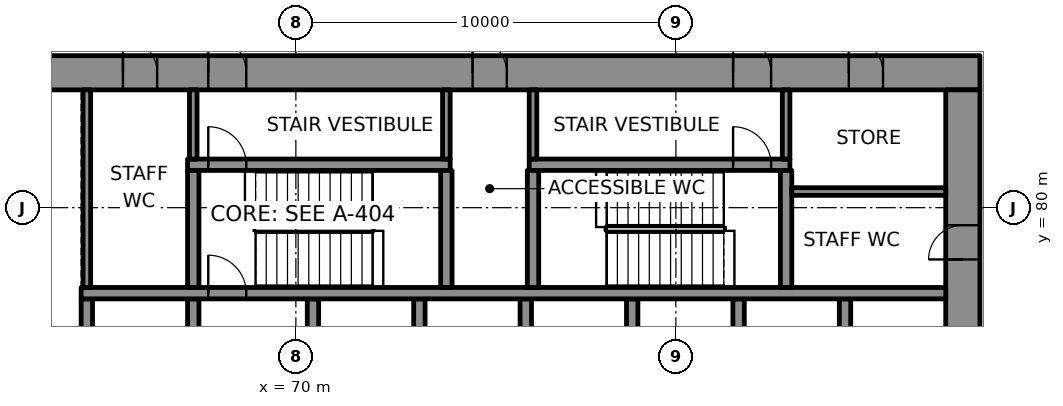
"""IFC4 building model, lengths in metres.
Left out: names, types, materials, properties, quantities, classifications, styles, units other than length and angle.
Written with IfcOpenShell. Run it as: python <this file> out.ifc"""

import sys

from ifc_helpers import new_model, si_unit, direction, frame, frame_2d, origin, place, context, subcontext, project, spatial, rectangle, extrude, element, fill, save


model = new_model("IFC4")
c1 = context("Model", 3, precision=1e-05, world=origin(), true_north=direction((0.0, 1.0)))
c2 = subcontext(c1, "Body", "Model", "MODEL_VIEW")
j1 = project(units=[si_unit("LENGTHUNIT", "METRE"), si_unit("PLANEANGLEUNIT", "RADIAN")], contexts=[c1])
p1 = place(None, origin())
s1 = spatial("IfcSite", under=j1, at=p1, CompositionType="ELEMENT")
p2 = place(p1, origin())
s2 = spatial("IfcBuilding", under=s1, at=p2, CompositionType="ELEMENT")
p3 = place(p2, frame((0.0, 0.0, 48.4)))
s3 = spatial("IfcBuildingStorey", under=s2, at=p3, CompositionType="ELEMENT", Elevation=48.4)
p4 = place(p3, frame((62.9, 83.55, 0.0), z_axis=(0.0, 0.0, 1.0), x_axis=(1.0, 0.0, 0.0)))
e1 = element("IfcWall", 1, at=p4, inside=s3, PredefinedType="SHEAR", context=c2, shape_type="SweptSolid", body=[
    extrude(rectangle(XDim=25.1, YDim=0.9, at=frame_2d((12.55, 0.0))), origin(), (0.0, 0.0, 1.0), 4.0),
])
p5 = place(p4, frame((4.795, 0.0, 0.0)))
e2 = element("IfcOpeningElement", 2, at=p5, cuts=e1, PredefinedType="OPENING", context=c2, shape_type="SweptSolid", body=[
    extrude(rectangle(XDim=1.0, YDim=2.1, at=frame_2d((0.5, 1.05))), frame((0.0, 0.46, 0.0), z_axis=(0.0, -1.0, 0.0), x_axis=(1.0, 0.0, 0.0)), (0.0, 0.0, 1.0), 0.92),
])
p6 = place(p4, frame((18.605, 0.0, 0.0)))
e3 = element("IfcOpeningElement", 3, at=p6, cuts=e1, PredefinedType="OPENING", context=c2, shape_type="SweptSolid", body=[
    extrude(rectangle(XDim=1.0, YDim=2.1, at=frame_2d((0.5, 1.05))), frame((0.0, 0.46, 0.0), z_axis=(0.0, -1.0, 0.0), x_axis=(1.0, 0.0, 0.0)), (0.0, 0.0, 1.0), 0.92),
])
p7 = place(p4, frame((2.55, 0.0, 0.0)))
e4 = element("IfcOpeningElement", 4, at=p7, cuts=e1, PredefinedType="OPENING", context=c2, shape_type="SweptSolid", body=[
    extrude(rectangle(XDim=0.9, YDim=2.1, at=frame_2d((0.45, 1.05))), frame((0.0, 0.46, 0.0), z_axis=(0.0, -1.0, 0.0), x_axis=(1.0, 0.0, 0.0)), (0.0, 0.0, 1.0), 0.92),
])
p8 = place(p4, frame((11.75, 0.0, 0.0)))
e5 = element("IfcOpeningElement", 5, at=p8, cuts=e1, PredefinedType="OPENING", context=c2, shape_type="SweptSolid", body=[
    extrude(rectangle(XDim=0.9, YDim=2.1, at=frame_2d((0.45, 1.05))), frame((0.0, 0.46, 0.0), z_axis=(0.0, -1.0, 0.0), x_axis=(1.0, 0.0, 0.0)), (0.0, 0.0, 1.0), 0.92),
])
p9 = place(p4, frame((21.65, 0.0, 0.0)))
e6 = element("IfcOpeningElement", 6, at=p9, cuts=e1, PredefinedType="OPENING", context=c2, shape_type="SweptSolid", body=[
    extrude(rectangle(XDim=0.9, YDim=2.1, at=frame_2d((0.45, 1.05))), frame((0.0, 0.46, 0.0), z_axis=(0.0, -1.0, 0.0), x_axis=(1.0, 0.0, 0.0)), (0.0, 0.0, 1.0), 0.92),
])
p10 = place(p3, frame((87.55, 66.9, 0.0), z_axis=(0.0, 0.0, 1.0), x_axis=(0.0, 1.0, 0.0)))
e7 = element("IfcWall", 7, at=p10, inside=s3, PredefinedType="SHEAR", context=c2, shape_type="SweptSolid", body=[
    extrude(rectangle(XDim=16.2, YDim=0.9, at=frame_2d((8.1, 0.0))), origin(), (0.0, 0.0, 1.0), 4.0),
])
p11 = place(p10, frame((5.5, 0.0, 0.0)))
e8 = element("IfcOpeningElement", 8, at=p11, cuts=e7, PredefinedType="OPENING", context=c2, shape_type="SweptSolid", body=[
    extrude(rectangle(XDim=1.8, YDim=2.1, at=frame_2d((0.9, 1.05))), frame((0.0, 0.46, 0.0), z_axis=(0.0, -1.0, 0.0), x_axis=(1.0, 0.0, 0.0)), (0.0, 0.0, 1.0), 0.92),
])
p12 = place(p10, frame((11.738, 0.0, 0.0)))
e9 = element("IfcOpeningElement", 9, at=p12, cuts=e7, PredefinedType="OPENING", context=c2, shape_type="SweptSolid", body=[
    extrude(rectangle(XDim=0.9, YDim=2.1, at=frame_2d((0.45, 1.05))), frame((0.0, 0.46, 0.0), z_axis=(0.0, -1.0, 0.0), x_axis=(1.0, 0.0, 0.0)), (0.0, 0.0, 1.0), 0.92),
])
for number, where, z_axis, x_axis in (
    (10, (64.5, 75.0, 0.0), (0.0, 0.0, 1.0), (0.0, 1.0, 0.0)),
    (11, (67.3, 75.0, 0.0), (0.0, 0.0, 1.0), (0.0, 1.0, 0.0)),
):
    element("IfcWall", number, at=place(p3, frame(where, z_axis=z_axis, x_axis=x_axis)), inside=s3, PredefinedType="SHEAR", context=c2, shape_type="SweptSolid", body=[
        extrude(rectangle(XDim=2.6, YDim=0.3, at=frame_2d((1.3, 0.0))), origin(), (0.0, 0.0, 1.0), 4.0),
    ])
p13 = place(p3, frame((70.45, 75.0, 0.0), z_axis=(0.0, 0.0, 1.0), x_axis=(0.0, 1.0, 0.0)))
e12 = element("IfcWall", 12, at=p13, inside=s3, PredefinedType="SHEAR", context=c2, shape_type="SweptSolid", body=[
    extrude(rectangle(XDim=2.6, YDim=0.3, at=frame_2d((1.3, 0.0))), origin(), (0.0, 0.0, 1.0), 4.0),
])
p14 = place(p13, frame((0.15, 0.0, 0.0)))
e13 = element("IfcOpeningElement", 13, at=p14, cuts=e12, PredefinedType="OPENING", context=c2, shape_type="SweptSolid", body=[
    extrude(rectangle(XDim=1.1, YDim=2.1, at=frame_2d((0.55, 1.05))), frame((0.0, 0.16, 0.0), z_axis=(0.0, -1.0, 0.0), x_axis=(1.0, 0.0, 0.0)), (0.0, 0.0, 1.0), 0.32),
])
for number, where, z_axis, x_axis in (
    (14, (73.25, 75.0, 0.0), (0.0, 0.0, 1.0), (0.0, 1.0, 0.0)),
    (15, (76.05, 75.0, 0.0), (0.0, 0.0, 1.0), (0.0, 1.0, 0.0)),
    (16, (78.85, 75.0, 0.0), (0.0, 0.0, 1.0), (0.0, 1.0, 0.0)),
    (17, (81.65, 75.0, 0.0), (0.0, 0.0, 1.0), (0.0, 1.0, 0.0)),
    (18, (84.45, 75.0, 0.0), (0.0, 0.0, 1.0), (0.0, 1.0, 0.0)),
):
    element("IfcWall", number, at=place(p3, frame(where, z_axis=z_axis, x_axis=x_axis)), inside=s3, PredefinedType="SHEAR", context=c2, shape_type="SweptSolid", body=[
        extrude(rectangle(XDim=2.6, YDim=0.3, at=frame_2d((1.3, 0.0))), origin(), (0.0, 0.0, 1.0), 4.0),
    ])
p15 = place(p3, frame((64.35, 77.75, 0.0), z_axis=(0.0, 0.0, 1.0), x_axis=(1.0, 0.0, 0.0)))
e19 = element("IfcWall", 19, at=p15, inside=s3, PredefinedType="SHEAR", context=c2, shape_type="SweptSolid", body=[
    extrude(rectangle(XDim=22.75, YDim=0.3, at=frame_2d((11.375, 0.0))), origin(), (0.0, 0.0, 1.0), 4.0),
])
p16 = place(p15, frame((3.345, 0.0, 0.0)))
e20 = element("IfcOpeningElement", 20, at=p16, cuts=e19, PredefinedType="OPENING", context=c2, shape_type="SweptSolid", body=[
    extrude(rectangle(XDim=1.0, YDim=2.1, at=frame_2d((0.5, 1.05))), frame((0.0, 0.16, 0.0), z_axis=(0.0, -1.0, 0.0), x_axis=(1.0, 0.0, 0.0)), (0.0, 0.0, 1.0), 0.32),
])
p17 = place(p3, frame((67.15, 81.13, 0.0), z_axis=(0.0, 0.0, 1.0), x_axis=(1.0, 0.0, 0.0)))
e21 = element("IfcWall", 21, at=p17, inside=s3, PredefinedType="SHEAR", context=c2, shape_type="SweptSolid", body=[
    extrude(rectangle(XDim=6.91, YDim=0.3, at=frame_2d((3.455, 0.0))), origin(), (0.0, 0.0, 1.0), 4.0),
])
p18 = place(p17, frame((0.545, 0.0, 0.0)))
e22 = element("IfcOpeningElement", 22, at=p18, cuts=e21, PredefinedType="OPENING", context=c2, shape_type="SweptSolid", body=[
    extrude(rectangle(XDim=1.0, YDim=2.1, at=frame_2d((0.5, 1.05))), frame((0.0, 0.16, 0.0), z_axis=(0.0, -1.0, 0.0), x_axis=(1.0, 0.0, 0.0)), (0.0, 0.0, 1.0), 0.32),
])
p19 = place(p3, frame((76.14, 81.13, 0.0), z_axis=(0.0, 0.0, 1.0), x_axis=(1.0, 0.0, 0.0)))
e23 = element("IfcWall", 23, at=p19, inside=s3, PredefinedType="SHEAR", context=c2, shape_type="SweptSolid", body=[
    extrude(rectangle(XDim=6.86, YDim=0.3, at=frame_2d((3.43, 0.0))), origin(), (0.0, 0.0, 1.0), 4.0),
])
p20 = place(p19, frame((5.365, 0.0, 0.0)))
e24 = element("IfcOpeningElement", 24, at=p20, cuts=e23, PredefinedType="OPENING", context=c2, shape_type="SweptSolid", body=[
    extrude(rectangle(XDim=1.0, YDim=2.1, at=frame_2d((0.5, 1.05))), frame((0.0, 0.16, 0.0), z_axis=(0.0, -1.0, 0.0), x_axis=(1.0, 0.0, 0.0)), (0.0, 0.0, 1.0), 0.32),
])
for number, where, z_axis, x_axis in (
    (25, (67.3, 77.9, 0.0), (0.0, 0.0, 1.0), (0.0, 1.0, 0.0)),
    (26, (73.96, 77.9, 0.0), (0.0, 0.0, 1.0), (0.0, 1.0, 0.0)),
    (27, (76.24, 77.9, 0.0), (0.0, 0.0, 1.0), (0.0, 1.0, 0.0)),
    (28, (82.9, 77.9, 0.0), (0.0, 0.0, 1.0), (0.0, 1.0, 0.0)),
):
    element("IfcWall", number, at=place(p3, frame(where, z_axis=z_axis, x_axis=x_axis)), inside=s3, PredefinedType="SHEAR", context=c2, shape_type="SweptSolid", body=[
        extrude(rectangle(XDim=3.08, YDim=0.3, at=frame_2d((1.54, 0.0))), origin(), (0.0, 0.0, 1.0), 4.0),
    ])
p21 = place(p3, frame((83.05, 80.425, 0.0), z_axis=(0.0, 0.0, 1.0), x_axis=(1.0, 0.0, 0.0)))
e29 = element("IfcWall", 29, at=p21, inside=s3, PredefinedType="PARTITIONING", context=c2, shape_type="SweptSolid", body=[
    extrude(rectangle(XDim=4.05, YDim=0.2, at=frame_2d((2.025, 0.0))), origin(), (0.0, 0.0, 1.0), 4.0),
])
p22 = place(p3, frame((64.5, 77.9, 0.0), z_axis=(0.0, 0.0, 1.0), x_axis=(0.0, 1.0, 0.0)))
e30 = element("IfcWall", 30, at=p22, inside=s3, PredefinedType="PARTITIONING", context=c2, shape_type="SweptSolid", body=[
    extrude(rectangle(XDim=5.2, YDim=0.2, at=frame_2d((2.6, 0.0))), origin(), (0.0, 0.0, 1.0), 4.0),
])
for number, where, z_axis, x_axis in (
    (31, (67.3, 81.28, 0.0), (0.0, 0.0, 1.0), (0.0, 1.0, 0.0)),
    (32, (73.96, 81.28, 0.0), (0.0, 0.0, 1.0), (0.0, 1.0, 0.0)),
    (33, (76.24, 81.28, 0.0), (0.0, 0.0, 1.0), (0.0, 1.0, 0.0)),
    (34, (82.9, 81.28, 0.0), (0.0, 0.0, 1.0), (0.0, 1.0, 0.0)),
):
    element("IfcWall", number, at=place(p3, frame(where, z_axis=z_axis, x_axis=x_axis)), inside=s3, PredefinedType="PARTITIONING", context=c2, shape_type="SweptSolid", body=[
        extrude(rectangle(XDim=1.82, YDim=0.2, at=frame_2d((0.91, 0.0))), origin(), (0.0, 0.0, 1.0), 4.0),
    ])
p23 = place(p16, origin())
e35 = element("IfcDoor", 35, at=p23, inside=s3, OperationType="SINGLE_SWING_LEFT", PredefinedType="DOOR", context=c2, shape_type="SweptSolid", body=[
    extrude(rectangle(XDim=1.0, YDim=2.1, at=frame_2d((0.5, 1.05))), frame((0.0, 0.025, 0.0), z_axis=(0.0, -1.0, 0.0), x_axis=(1.0, 0.0, 0.0)), (0.0, 0.0, 1.0), 0.05),
])
fill(e20, e35)
p24 = place(p18, origin())
e36 = element("IfcDoor", 36, at=p24, inside=s3, OperationType="SINGLE_SWING_RIGHT", PredefinedType="DOOR", context=c2, shape_type="SweptSolid", body=[
    extrude(rectangle(XDim=1.0, YDim=2.1, at=frame_2d((0.5, 1.05))), frame((0.0, 0.025, 0.0), z_axis=(0.0, -1.0, 0.0), x_axis=(1.0, 0.0, 0.0)), (0.0, 0.0, 1.0), 0.05),
])
fill(e22, e36)
p25 = place(p5, origin())
e37 = element("IfcDoor", 37, at=p25, inside=s3, OperationType="SINGLE_SWING_LEFT", PredefinedType="DOOR", context=c2, shape_type="SweptSolid", body=[
    extrude(rectangle(XDim=1.0, YDim=2.1, at=frame_2d((0.5, 1.05))), frame((0.0, 0.17, 0.0), z_axis=(0.0, -1.0, 0.0), x_axis=(1.0, 0.0, 0.0)), (0.0, 0.0, 1.0), 0.34),
])
fill(e2, e37)
p26 = place(p20, origin())
e38 = element("IfcDoor", 38, at=p26, inside=s3, OperationType="SINGLE_SWING_RIGHT", PredefinedType="DOOR", context=c2, shape_type="SweptSolid", body=[
    extrude(rectangle(XDim=1.0, YDim=2.1, at=frame_2d((0.5, 1.05))), frame((0.0, 0.025, 0.0), z_axis=(0.0, -1.0, 0.0), x_axis=(1.0, 0.0, 0.0)), (0.0, 0.0, 1.0), 0.05),
])
fill(e24, e38)
p27 = place(p6, origin())
e39 = element("IfcDoor", 39, at=p27, inside=s3, OperationType="SINGLE_SWING_LEFT", PredefinedType="DOOR", context=c2, shape_type="SweptSolid", body=[
    extrude(rectangle(XDim=1.0, YDim=2.1, at=frame_2d((0.5, 1.05))), frame((0.0, 0.17, 0.0), z_axis=(0.0, -1.0, 0.0), x_axis=(1.0, 0.0, 0.0)), (0.0, 0.0, 1.0), 0.34),
])
fill(e3, e39)
p28 = place(p7, origin())
e40 = element("IfcDoor", 40, at=p28, inside=s3, OperationType="SINGLE_SWING_RIGHT", PredefinedType="DOOR", context=c2, shape_type="SweptSolid", body=[
    extrude(rectangle(XDim=0.9, YDim=2.1, at=frame_2d((0.45, 1.05))), frame((0.0, 0.17, 0.0), z_axis=(0.0, -1.0, 0.0), x_axis=(1.0, 0.0, 0.0)), (0.0, 0.0, 1.0), 0.34),
])
fill(e4, e40)
p29 = place(p8, origin())
e41 = element("IfcDoor", 41, at=p29, inside=s3, OperationType="SINGLE_SWING_LEFT", PredefinedType="DOOR", context=c2, shape_type="SweptSolid", body=[
    extrude(rectangle(XDim=0.9, YDim=2.1, at=frame_2d((0.45, 1.05))), frame((0.0, 0.17, 0.0), z_axis=(0.0, -1.0, 0.0), x_axis=(1.0, 0.0, 0.0)), (0.0, 0.0, 1.0), 0.34),
])
fill(e5, e41)
p30 = place(p12, origin())
e42 = element("IfcDoor", 42, at=p30, inside=s3, OperationType="SINGLE_SWING_RIGHT", PredefinedType="DOOR", context=c2, shape_type="SweptSolid", body=[
    extrude(rectangle(XDim=0.9, YDim=2.1, at=frame_2d((0.45, 1.05))), frame((0.0, 0.17, 0.0), z_axis=(0.0, -1.0, 0.0), x_axis=(1.0, 0.0, 0.0)), (0.0, 0.0, 1.0), 0.34),
])
fill(e9, e42)
p31 = place(p9, origin())
e43 = element("IfcDoor", 43, at=p31, inside=s3, OperationType="SINGLE_SWING_LEFT", PredefinedType="DOOR", context=c2, shape_type="SweptSolid", body=[
    extrude(rectangle(XDim=0.9, YDim=2.1, at=frame_2d((0.45, 1.05))), frame((0.0, 0.17, 0.0), z_axis=(0.0, -1.0, 0.0), x_axis=(1.0, 0.0, 0.0)), (0.0, 0.0, 1.0), 0.34),
])
fill(e6, e43)
save(model, sys.argv[1])
